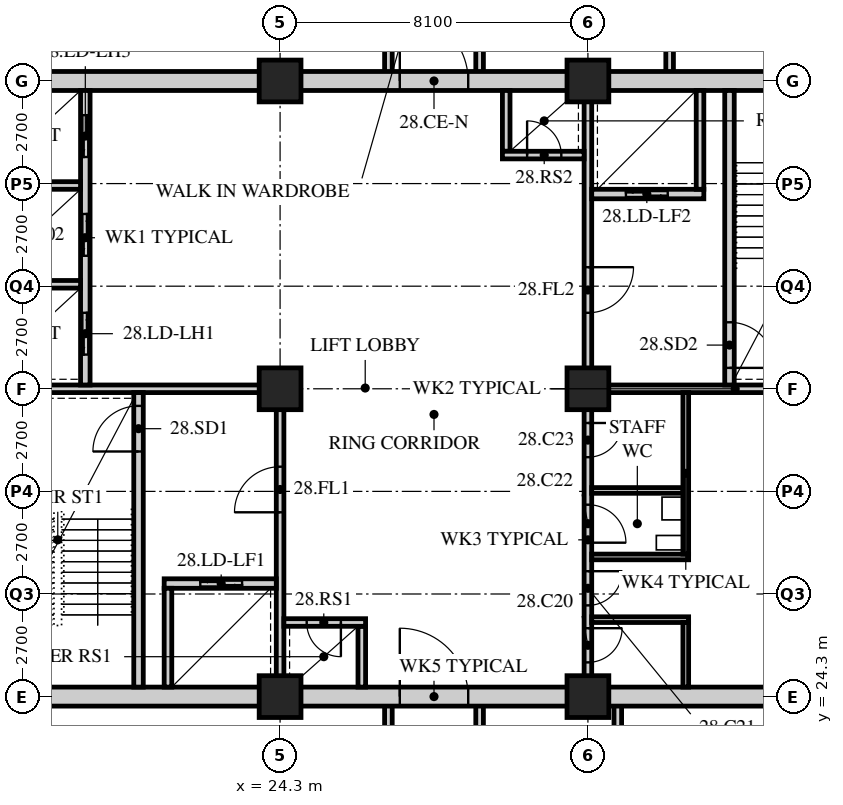
"""IFC4 building model, lengths in metres.
Left out: names, types, materials, properties, quantities, classifications, styles, units other than length and angle.
Written with IfcOpenShell. Run it as: python <this file> out.ifc"""

import sys

from ifc_helpers import new_model, si_unit, direction, frame, frame_2d, origin, origin_2d, place, context, subcontext, project, spatial, rectangle, hollow_rectangle, extrude, element, fill, save


model = new_model("IFC4")
c1 = context("Model", 3, precision=1e-05, world=origin(), true_north=direction((0.0, 1.0)))
c2 = subcontext(c1, "Body", "Model", "MODEL_VIEW")
j1 = project(units=[si_unit("LENGTHUNIT", "METRE"), si_unit("PLANEANGLEUNIT", "RADIAN")], contexts=[c1])
p1 = place(None, origin())
s1 = spatial("IfcSite", under=j1, at=p1, CompositionType="ELEMENT")
p2 = place(p1, origin())
s2 = spatial("IfcBuilding", under=s1, at=p2, CompositionType="ELEMENT")
p3 = place(p2, frame((0.0, 0.0, 113.6)))
s3 = spatial("IfcBuildingStorey", under=s2, at=p3, CompositionType="ELEMENT", Elevation=113.6)
for number, where, z_axis, x_axis in (
    (1, (24.3, 24.3, 0.0), (0.0, 0.0, 1.0), (1.0, 0.0, 0.0)),
    (2, (24.3, 32.4, 0.0), (0.0, 0.0, 1.0), (1.0, 0.0, 0.0)),
    (3, (24.3, 40.5, 0.0), (0.0, 0.0, 1.0), (1.0, 0.0, 0.0)),
    (4, (32.4, 24.3, 0.0), (0.0, 0.0, 1.0), (1.0, 0.0, 0.0)),
    (5, (32.4, 32.4, 0.0), (0.0, 0.0, 1.0), (1.0, 0.0, 0.0)),
    (6, (32.4, 40.5, 0.0), (0.0, 0.0, 1.0), (1.0, 0.0, 0.0)),
):
    element("IfcColumn", number, at=place(p3, frame(where, z_axis=z_axis, x_axis=x_axis)), inside=s3, PredefinedType="COLUMN", context=c2, shape_type="SweptSolid", body=[
        extrude(hollow_rectangle(XDim=1.1, YDim=1.1, WallThickness=0.1, at=origin_2d()), origin(), (0.0, 0.0, 1.0), 3.4),
    ])
for number, where, z_axis, x_axis in (
    (7, (33.186, 19.35, 0.0), (0.0, 0.0, 1.0), (0.0, 1.0, 0.0)),
    (8, (27.15, 19.35, 0.0), (0.0, 0.0, 1.0), (0.0, 1.0, 0.0)),
    (9, (29.55, 19.35, 0.0), (0.0, 0.0, 1.0), (0.0, 1.0, 0.0)),
):
    element("IfcWall", number, at=place(p3, frame(where, z_axis=z_axis, x_axis=x_axis)), inside=s3, PredefinedType="SOLIDWALL", context=c2, shape_type="SweptSolid", body=[
        extrude(rectangle(XDim=4.95, YDim=0.2, at=frame_2d((2.475, 0.0))), origin(), (0.0, 0.0, 1.0), 3.19),
    ])
for number, where, z_axis, x_axis in (
    (10, (34.55, 44.1, 0.0), (0.0, 0.0, 1.0), (0.0, -1.0, 0.0)),
    (11, (27.15, 40.5, 0.0), (0.0, 0.0, 1.0), (0.0, 1.0, 0.0)),
    (12, (29.55, 40.5, 0.0), (0.0, 0.0, 1.0), (0.0, 1.0, 0.0)),
):
    element("IfcWall", number, at=place(p3, frame(where, z_axis=z_axis, x_axis=x_axis)), inside=s3, PredefinedType="SOLIDWALL", context=c2, shape_type="SweptSolid", body=[
        extrude(rectangle(XDim=3.6, YDim=0.2, at=frame_2d((1.8, 0.0))), origin(), (0.0, 0.0, 1.0), 3.19),
    ])
p4 = place(p3, frame((15.95, 24.3, 0.0), z_axis=(0.0, 0.0, 1.0), x_axis=(1.0, 0.0, 0.0)))
e13 = element("IfcWall", 13, at=p4, inside=s3, PredefinedType="SOLIDWALL", context=c2, shape_type="SweptSolid", body=[
    extrude(rectangle(XDim=24.8, YDim=0.5, at=frame_2d((12.4, 0.0))), origin(), (0.0, 0.0, 1.0), 2.54),
])
p5 = place(p4, frame((11.5, 0.0, 0.0)))
e14 = element("IfcOpeningElement", 14, at=p5, cuts=e13, PredefinedType="OPENING", context=c2, shape_type="SweptSolid", body=[
    extrude(rectangle(XDim=1.8, YDim=2.4, at=frame_2d((0.9, 1.2))), frame((0.0, 0.26, 0.0), z_axis=(0.0, -1.0, 0.0), x_axis=(1.0, 0.0, 0.0)), (0.0, 0.0, 1.0), 0.52),
])
p6 = place(p3, frame((15.95, 40.5, 0.0), z_axis=(0.0, 0.0, 1.0), x_axis=(1.0, 0.0, 0.0)))
e15 = element("IfcWall", 15, at=p6, inside=s3, PredefinedType="SOLIDWALL", context=c2, shape_type="SweptSolid", body=[
    extrude(rectangle(XDim=24.8, YDim=0.5, at=frame_2d((12.4, 0.0))), origin(), (0.0, 0.0, 1.0), 2.54),
])
p7 = place(p6, frame((11.5, 0.0, 0.0)))
e16 = element("IfcOpeningElement", 16, at=p7, cuts=e15, PredefinedType="OPENING", context=c2, shape_type="SweptSolid", body=[
    extrude(rectangle(XDim=1.8, YDim=2.4, at=frame_2d((0.9, 1.2))), frame((0.0, 0.26, 0.0), z_axis=(0.0, -1.0, 0.0), x_axis=(1.0, 0.0, 0.0)), (0.0, 0.0, 1.0), 0.52),
])
p8 = place(p3, frame((16.45, 32.4, 0.0), z_axis=(0.0, 0.0, 1.0), x_axis=(1.0, 0.0, 0.0)))
e17 = element("IfcWall", 17, at=p8, inside=s3, PredefinedType="SOLIDWALL", context=c2, shape_type="SweptSolid", body=[
    extrude(rectangle(XDim=7.95, YDim=0.2, at=frame_2d((3.975, 0.0))), origin(), (0.0, 0.0, 1.0), 2.578),
])
p9 = place(p3, frame((24.3, 24.55, 0.0), z_axis=(0.0, 0.0, 1.0), x_axis=(0.0, 1.0, 0.0)))
e18 = element("IfcWall", 18, at=p9, inside=s3, PredefinedType="SOLIDWALL", context=c2, shape_type="SweptSolid", body=[
    extrude(rectangle(XDim=7.75, YDim=0.2, at=frame_2d((3.875, 0.0))), origin(), (0.0, 0.0, 1.0), 2.578),
])
p10 = place(p9, frame((4.6, 0.0, 0.0)))
e19 = element("IfcOpeningElement", 19, at=p10, cuts=e18, PredefinedType="OPENING", context=c2, shape_type="SweptSolid", body=[
    extrude(rectangle(XDim=1.2, YDim=2.1, at=frame_2d((0.6, 1.05))), frame((0.0, 0.11, 0.0), z_axis=(0.0, -1.0, 0.0), x_axis=(1.0, 0.0, 0.0)), (0.0, 0.0, 1.0), 0.22),
])
p11 = place(p3, frame((20.575, 24.55, 0.0), z_axis=(0.0, 0.0, 1.0), x_axis=(0.0, 1.0, 0.0)))
e20 = element("IfcWall", 20, at=p11, inside=s3, PredefinedType="SOLIDWALL", context=c2, shape_type="SweptSolid", body=[
    extrude(rectangle(XDim=7.75, YDim=0.25, at=frame_2d((3.875, 0.0))), origin(), (0.0, 0.0, 1.0), 3.19),
])
p12 = place(p11, frame((6.2, 0.0, 0.0)))
e21 = element("IfcOpeningElement", 21, at=p12, cuts=e20, PredefinedType="OPENING", context=c2, shape_type="SweptSolid", body=[
    extrude(rectangle(XDim=1.2, YDim=2.1, at=frame_2d((0.6, 1.05))), frame((0.0, 0.135, 0.0), z_axis=(0.0, -1.0, 0.0), x_axis=(1.0, 0.0, 0.0)), (0.0, 0.0, 1.0), 0.27),
])
p13 = place(p3, frame((21.25, 27.275, 0.0), z_axis=(0.0, 0.0, 1.0), x_axis=(1.0, 0.0, 0.0)))
e22 = element("IfcWall", 22, at=p13, inside=s3, PredefinedType="SOLIDWALL", context=c2, shape_type="SweptSolid", body=[
    extrude(rectangle(XDim=2.95, YDim=0.25, at=frame_2d((1.475, 0.0))), origin(), (0.0, 0.0, 1.0), 3.19),
])
p14 = place(p13, frame((0.95, 0.0, 0.0)))
e23 = element("IfcOpeningElement", 23, at=p14, cuts=e22, PredefinedType="OPENING", context=c2, shape_type="SweptSolid", body=[
    extrude(rectangle(XDim=1.1, YDim=2.4, at=frame_2d((0.55, 1.2))), frame((0.0, 0.135, 0.0), z_axis=(0.0, -1.0, 0.0), x_axis=(1.0, 0.0, 0.0)), (0.0, 0.0, 1.0), 0.27),
])
p15 = place(p3, frame((21.35, 24.55, 0.0), z_axis=(0.0, 0.0, 1.0), x_axis=(0.0, 1.0, 0.0)))
e24 = element("IfcWall", 24, at=p15, inside=s3, PredefinedType="SOLIDWALL", context=c2, shape_type="SweptSolid", body=[
    extrude(rectangle(XDim=2.6, YDim=0.2, at=frame_2d((1.3, 0.0))), origin(), (0.0, 0.0, 1.0), 3.19),
])
p16 = place(p3, frame((19.175, 32.5, 0.0), z_axis=(0.0, 0.0, 1.0), x_axis=(0.0, 1.0, 0.0)))
e25 = element("IfcWall", 25, at=p16, inside=s3, PredefinedType="SOLIDWALL", context=c2, shape_type="SweptSolid", body=[
    extrude(rectangle(XDim=7.75, YDim=0.25, at=frame_2d((3.875, 0.0))), origin(), (0.0, 0.0, 1.0), 3.19),
])
p17 = place(p16, frame((0.8, 0.0, 0.0)))
e26 = element("IfcOpeningElement", 26, at=p17, cuts=e25, PredefinedType="OPENING", context=c2, shape_type="SweptSolid", body=[
    extrude(rectangle(XDim=1.1, YDim=2.4, at=frame_2d((0.55, 1.2))), frame((0.0, 0.135, 0.0), z_axis=(0.0, -1.0, 0.0), x_axis=(1.0, 0.0, 0.0)), (0.0, 0.0, 1.0), 0.27),
])
p18 = place(p16, frame((3.4, 0.0, 0.0)))
e27 = element("IfcOpeningElement", 27, at=p18, cuts=e25, PredefinedType="OPENING", context=c2, shape_type="SweptSolid", body=[
    extrude(rectangle(XDim=1.1, YDim=2.4, at=frame_2d((0.55, 1.2))), frame((0.0, 0.135, 0.0), z_axis=(0.0, -1.0, 0.0), x_axis=(1.0, 0.0, 0.0)), (0.0, 0.0, 1.0), 0.27),
])
p19 = place(p16, frame((6.0, 0.0, 0.0)))
e28 = element("IfcOpeningElement", 28, at=p19, cuts=e25, PredefinedType="OPENING", context=c2, shape_type="SweptSolid", body=[
    extrude(rectangle(XDim=1.1, YDim=2.4, at=frame_2d((0.55, 1.2))), frame((0.0, 0.135, 0.0), z_axis=(0.0, -1.0, 0.0), x_axis=(1.0, 0.0, 0.0)), (0.0, 0.0, 1.0), 0.27),
])
for number, where, z_axis, x_axis in (
    (29, (16.45, 35.15, 0.0), (0.0, 0.0, 1.0), (1.0, 0.0, 0.0)),
    (30, (16.45, 37.75, 0.0), (0.0, 0.0, 1.0), (1.0, 0.0, 0.0)),
):
    element("IfcWall", number, at=place(p3, frame(where, z_axis=z_axis, x_axis=x_axis)), inside=s3, PredefinedType="SOLIDWALL", context=c2, shape_type="SweptSolid", body=[
        extrude(rectangle(XDim=2.6, YDim=0.2, at=frame_2d((1.3, 0.0))), origin(), (0.0, 0.0, 1.0), 3.19),
    ])
p20 = place(p3, frame((26.45, 24.55, 0.0), z_axis=(0.0, 0.0, 1.0), x_axis=(0.0, 1.0, 0.0)))
e31 = element("IfcWall", 31, at=p20, inside=s3, PredefinedType="SOLIDWALL", context=c2, shape_type="SweptSolid", body=[
    extrude(rectangle(XDim=1.6, YDim=0.2, at=frame_2d((0.8, 0.0))), origin(), (0.0, 0.0, 1.0), 3.19),
])
p21 = place(p3, frame((24.4, 26.25, 0.0), z_axis=(0.0, 0.0, 1.0), x_axis=(1.0, 0.0, 0.0)))
e32 = element("IfcWall", 32, at=p21, inside=s3, PredefinedType="SOLIDWALL", context=c2, shape_type="SweptSolid", body=[
    extrude(rectangle(XDim=2.15, YDim=0.2, at=frame_2d((1.075, 0.0))), origin(), (0.0, 0.0, 1.0), 3.19),
])
p22 = place(p21, frame((0.6, 0.0, 0.0)))
e33 = element("IfcOpeningElement", 33, at=p22, cuts=e32, PredefinedType="OPENING", context=c2, shape_type="SweptSolid", body=[
    extrude(rectangle(XDim=0.9, YDim=2.1, at=frame_2d((0.45, 1.05))), frame((0.0, 0.11, 0.0), z_axis=(0.0, -1.0, 0.0), x_axis=(1.0, 0.0, 0.0)), (0.0, 0.0, 1.0), 0.22),
])
p23 = place(p3, frame((32.3, 32.4, 0.0), z_axis=(0.0, 0.0, 1.0), x_axis=(1.0, 0.0, 0.0)))
e34 = element("IfcWall", 34, at=p23, inside=s3, PredefinedType="SOLIDWALL", context=c2, shape_type="SweptSolid", body=[
    extrude(rectangle(XDim=7.95, YDim=0.2, at=frame_2d((3.975, 0.0))), origin(), (0.0, 0.0, 1.0), 2.578),
])
p24 = place(p3, frame((32.4, 32.5, 0.0), z_axis=(0.0, 0.0, 1.0), x_axis=(0.0, 1.0, 0.0)))
e35 = element("IfcWall", 35, at=p24, inside=s3, PredefinedType="SOLIDWALL", context=c2, shape_type="SweptSolid", body=[
    extrude(rectangle(XDim=7.75, YDim=0.2, at=frame_2d((3.875, 0.0))), origin(), (0.0, 0.0, 1.0), 2.578),
])
p25 = place(p24, frame((1.9, 0.0, 0.0)))
e36 = element("IfcOpeningElement", 36, at=p25, cuts=e35, PredefinedType="OPENING", context=c2, shape_type="SweptSolid", body=[
    extrude(rectangle(XDim=1.2, YDim=2.1, at=frame_2d((0.6, 1.05))), frame((0.0, 0.11, 0.0), z_axis=(0.0, -1.0, 0.0), x_axis=(1.0, 0.0, 0.0)), (0.0, 0.0, 1.0), 0.22),
])
p26 = place(p3, frame((36.125, 32.5, 0.0), z_axis=(0.0, 0.0, 1.0), x_axis=(0.0, 1.0, 0.0)))
e37 = element("IfcWall", 37, at=p26, inside=s3, PredefinedType="SOLIDWALL", context=c2, shape_type="SweptSolid", body=[
    extrude(rectangle(XDim=7.75, YDim=0.25, at=frame_2d((3.875, 0.0))), origin(), (0.0, 0.0, 1.0), 3.19),
])
p27 = place(p26, frame((0.45, 0.0, 0.0)))
e38 = element("IfcOpeningElement", 38, at=p27, cuts=e37, PredefinedType="OPENING", context=c2, shape_type="SweptSolid", body=[
    extrude(rectangle(XDim=1.2, YDim=2.1, at=frame_2d((0.6, 1.05))), frame((0.0, 0.135, 0.0), z_axis=(0.0, -1.0, 0.0), x_axis=(1.0, 0.0, 0.0)), (0.0, 0.0, 1.0), 0.27),
])
p28 = place(p3, frame((32.5, 37.525, 0.0), z_axis=(0.0, 0.0, 1.0), x_axis=(1.0, 0.0, 0.0)))
e39 = element("IfcWall", 39, at=p28, inside=s3, PredefinedType="SOLIDWALL", context=c2, shape_type="SweptSolid", body=[
    extrude(rectangle(XDim=2.95, YDim=0.25, at=frame_2d((1.475, 0.0))), origin(), (0.0, 0.0, 1.0), 3.19),
])
p29 = place(p28, frame((0.9, 0.0, 0.0)))
e40 = element("IfcOpeningElement", 40, at=p29, cuts=e39, PredefinedType="OPENING", context=c2, shape_type="SweptSolid", body=[
    extrude(rectangle(XDim=1.1, YDim=2.4, at=frame_2d((0.55, 1.2))), frame((0.0, 0.135, 0.0), z_axis=(0.0, -1.0, 0.0), x_axis=(1.0, 0.0, 0.0)), (0.0, 0.0, 1.0), 0.27),
])
p30 = place(p3, frame((35.35, 37.65, 0.0), z_axis=(0.0, 0.0, 1.0), x_axis=(0.0, 1.0, 0.0)))
e41 = element("IfcWall", 41, at=p30, inside=s3, PredefinedType="SOLIDWALL", context=c2, shape_type="SweptSolid", body=[
    extrude(rectangle(XDim=2.6, YDim=0.2, at=frame_2d((1.3, 0.0))), origin(), (0.0, 0.0, 1.0), 3.19),
])
p31 = place(p3, frame((30.25, 38.65, 0.0), z_axis=(0.0, 0.0, 1.0), x_axis=(0.0, 1.0, 0.0)))
e42 = element("IfcWall", 42, at=p31, inside=s3, PredefinedType="SOLIDWALL", context=c2, shape_type="SweptSolid", body=[
    extrude(rectangle(XDim=1.6, YDim=0.2, at=frame_2d((0.8, 0.0))), origin(), (0.0, 0.0, 1.0), 3.19),
])
p32 = place(p3, frame((30.15, 38.55, 0.0), z_axis=(0.0, 0.0, 1.0), x_axis=(1.0, 0.0, 0.0)))
e43 = element("IfcWall", 43, at=p32, inside=s3, PredefinedType="SOLIDWALL", context=c2, shape_type="SweptSolid", body=[
    extrude(rectangle(XDim=2.15, YDim=0.2, at=frame_2d((1.075, 0.0))), origin(), (0.0, 0.0, 1.0), 3.19),
])
p33 = place(p32, frame((0.65, 0.0, 0.0)))
e44 = element("IfcOpeningElement", 44, at=p33, cuts=e43, PredefinedType="OPENING", context=c2, shape_type="SweptSolid", body=[
    extrude(rectangle(XDim=0.9, YDim=2.1, at=frame_2d((0.45, 1.05))), frame((0.0, 0.11, 0.0), z_axis=(0.0, -1.0, 0.0), x_axis=(1.0, 0.0, 0.0)), (0.0, 0.0, 1.0), 0.22),
])
p34 = place(p3, frame((32.4, 24.55, 0.0), z_axis=(0.0, 0.0, 1.0), x_axis=(0.0, 1.0, 0.0)))
e45 = element("IfcWall", 45, at=p34, inside=s3, PredefinedType="PARTITIONING", context=c2, shape_type="SweptSolid", body=[
    extrude(rectangle(XDim=7.75, YDim=0.2, at=frame_2d((3.875, 0.0))), origin(), (0.0, 0.0, 1.0), 2.578),
])
p35 = place(p34, frame((0.65, 0.0, 0.0)))
e46 = element("IfcOpeningElement", 46, at=p35, cuts=e45, PredefinedType="OPENING", context=c2, shape_type="SweptSolid", body=[
    extrude(rectangle(XDim=0.9, YDim=2.1, at=frame_2d((0.45, 1.05))), frame((0.0, 0.11, 0.0), z_axis=(0.0, -1.0, 0.0), x_axis=(1.0, 0.0, 0.0)), (0.0, 0.0, 1.0), 0.22),
])
p36 = place(p34, frame((2.15, 0.0, 0.0)))
e47 = element("IfcOpeningElement", 47, at=p36, cuts=e45, PredefinedType="OPENING", context=c2, shape_type="SweptSolid", body=[
    extrude(rectangle(XDim=0.9, YDim=2.1, at=frame_2d((0.45, 1.05))), frame((0.0, 0.11, 0.0), z_axis=(0.0, -1.0, 0.0), x_axis=(1.0, 0.0, 0.0)), (0.0, 0.0, 1.0), 0.22),
])
p37 = place(p34, frame((3.8, 0.0, 0.0)))
e48 = element("IfcOpeningElement", 48, at=p37, cuts=e45, PredefinedType="OPENING", context=c2, shape_type="SweptSolid", body=[
    extrude(rectangle(XDim=1.0, YDim=2.1, at=frame_2d((0.5, 1.05))), frame((0.0, 0.11, 0.0), z_axis=(0.0, -1.0, 0.0), x_axis=(1.0, 0.0, 0.0)), (0.0, 0.0, 1.0), 0.22),
])
p38 = place(p34, frame((6.05, 0.0, 0.0)))
e49 = element("IfcOpeningElement", 49, at=p38, cuts=e45, PredefinedType="OPENING", context=c2, shape_type="SweptSolid", body=[
    extrude(rectangle(XDim=0.9, YDim=2.1, at=frame_2d((0.45, 1.05))), frame((0.0, 0.11, 0.0), z_axis=(0.0, -1.0, 0.0), x_axis=(1.0, 0.0, 0.0)), (0.0, 0.0, 1.0), 0.22),
])
for number, where, z_axis, x_axis in (
    (50, (32.5, 26.325, 0.0), (0.0, 0.0, 1.0), (1.0, 0.0, 0.0)),
    (51, (32.5, 27.975, 0.0), (0.0, 0.0, 1.0), (1.0, 0.0, 0.0)),
):
    element("IfcWall", number, at=place(p3, frame(where, z_axis=z_axis, x_axis=x_axis)), inside=s3, PredefinedType="PARTITIONING", context=c2, shape_type="SweptSolid", body=[
        extrude(rectangle(XDim=2.55, YDim=0.15, at=frame_2d((1.275, 0.0))), origin(), (0.0, 0.0, 1.0), 3.19),
    ])
p39 = place(p3, frame((32.5, 29.725, 0.0), z_axis=(0.0, 0.0, 1.0), x_axis=(1.0, 0.0, 0.0)))
e52 = element("IfcWall", 52, at=p39, inside=s3, PredefinedType="PARTITIONING", context=c2, shape_type="SweptSolid", body=[
    extrude(rectangle(XDim=2.4, YDim=0.15, at=frame_2d((1.2, 0.0))), origin(), (0.0, 0.0, 1.0), 3.19),
])
p40 = place(p3, frame((34.975, 24.55, 0.0), z_axis=(0.0, 0.0, 1.0), x_axis=(0.0, 1.0, 0.0)))
e53 = element("IfcWall", 53, at=p40, inside=s3, PredefinedType="PARTITIONING", context=c2, shape_type="SweptSolid", body=[
    extrude(rectangle(XDim=1.7, YDim=0.15, at=frame_2d((0.85, 0.0))), origin(), (0.0, 0.0, 1.0), 3.19),
])
p41 = place(p3, frame((34.975, 28.05, 0.0), z_axis=(0.0, 0.0, 1.0), x_axis=(0.0, 1.0, 0.0)))
e54 = element("IfcWall", 54, at=p41, inside=s3, PredefinedType="PARTITIONING", context=c2, shape_type="SweptSolid", body=[
    extrude(rectangle(XDim=4.25, YDim=0.15, at=frame_2d((2.125, 0.0))), origin(), (0.0, 0.0, 1.0), 3.19),
])
p42 = place(p35, origin())
e55 = element("IfcDoor", 55, at=p42, inside=s3, OperationType="SINGLE_SWING_LEFT", PredefinedType="DOOR", context=c2, shape_type="SweptSolid", body=[
    extrude(rectangle(XDim=0.9, YDim=2.1, at=frame_2d((0.45, 1.05))), frame((0.0, 0.025, 0.0), z_axis=(0.0, -1.0, 0.0), x_axis=(1.0, 0.0, 0.0)), (0.0, 0.0, 1.0), 0.05),
])
fill(e46, e55)
p43 = place(p36, origin())
e56 = element("IfcDoor", 56, at=p43, inside=s3, OperationType="SINGLE_SWING_LEFT", PredefinedType="DOOR", context=c2, shape_type="SweptSolid", body=[
    extrude(rectangle(XDim=0.9, YDim=2.1, at=frame_2d((0.45, 1.05))), frame((0.0, 0.025, 0.0), z_axis=(0.0, -1.0, 0.0), x_axis=(1.0, 0.0, 0.0)), (0.0, 0.0, 1.0), 0.05),
])
fill(e47, e56)
p44 = place(p37, origin())
e57 = element("IfcDoor", 57, at=p44, inside=s3, OperationType="SINGLE_SWING_RIGHT", PredefinedType="DOOR", context=c2, shape_type="SweptSolid", body=[
    extrude(rectangle(XDim=1.0, YDim=2.1, at=frame_2d((0.5, 1.05))), frame((0.0, 0.025, 0.0), z_axis=(0.0, -1.0, 0.0), x_axis=(1.0, 0.0, 0.0)), (0.0, 0.0, 1.0), 0.05),
])
fill(e48, e57)
p45 = place(p38, origin())
e58 = element("IfcDoor", 58, at=p45, inside=s3, OperationType="SINGLE_SWING_LEFT", PredefinedType="DOOR", context=c2, shape_type="SweptSolid", body=[
    extrude(rectangle(XDim=0.9, YDim=2.1, at=frame_2d((0.45, 1.05))), frame((0.0, 0.025, 0.0), z_axis=(0.0, -1.0, 0.0), x_axis=(1.0, 0.0, 0.0)), (0.0, 0.0, 1.0), 0.05),
])
fill(e49, e58)
p46 = place(p12, origin())
e59 = element("IfcDoor", 59, at=p46, inside=s3, OperationType="SINGLE_SWING_LEFT", PredefinedType="DOOR", context=c2, shape_type="SweptSolid", body=[
    extrude(rectangle(XDim=1.2, YDim=2.1, at=frame_2d((0.6, 1.05))), frame((0.0, 0.025, 0.0), z_axis=(0.0, -1.0, 0.0), x_axis=(1.0, 0.0, 0.0)), (0.0, 0.0, 1.0), 0.05),
])
fill(e21, e59)
p47 = place(p10, origin())
e60 = element("IfcDoor", 60, at=p47, inside=s3, OperationType="SINGLE_SWING_LEFT", PredefinedType="DOOR", context=c2, shape_type="SweptSolid", body=[
    extrude(rectangle(XDim=1.2, YDim=2.1, at=frame_2d((0.6, 1.05))), frame((0.0, 0.025, 0.0), z_axis=(0.0, -1.0, 0.0), x_axis=(1.0, 0.0, 0.0)), (0.0, 0.0, 1.0), 0.05),
])
fill(e19, e60)
p48 = place(p22, origin())
e61 = element("IfcDoor", 61, at=p48, inside=s3, OperationType="SINGLE_SWING_LEFT", PredefinedType="DOOR", context=c2, shape_type="SweptSolid", body=[
    extrude(rectangle(XDim=0.9, YDim=2.1, at=frame_2d((0.45, 1.05))), frame((0.0, 0.025, 0.0), z_axis=(0.0, -1.0, 0.0), x_axis=(1.0, 0.0, 0.0)), (0.0, 0.0, 1.0), 0.05),
])
fill(e33, e61)
p49 = place(p27, origin())
e62 = element("IfcDoor", 62, at=p49, inside=s3, OperationType="SINGLE_SWING_RIGHT", PredefinedType="DOOR", context=c2, shape_type="SweptSolid", body=[
    extrude(rectangle(XDim=1.2, YDim=2.1, at=frame_2d((0.6, 1.05))), frame((0.0, 0.025, 0.0), z_axis=(0.0, -1.0, 0.0), x_axis=(1.0, 0.0, 0.0)), (0.0, 0.0, 1.0), 0.05),
])
fill(e38, e62)
p50 = place(p25, origin())
e63 = element("IfcDoor", 63, at=p50, inside=s3, OperationType="SINGLE_SWING_LEFT", PredefinedType="DOOR", context=c2, shape_type="SweptSolid", body=[
    extrude(rectangle(XDim=1.2, YDim=2.1, at=frame_2d((0.6, 1.05))), frame((0.0, 0.025, 0.0), z_axis=(0.0, -1.0, 0.0), x_axis=(1.0, 0.0, 0.0)), (0.0, 0.0, 1.0), 0.05),
])
fill(e36, e63)
p51 = place(p33, origin())
e64 = element("IfcDoor", 64, at=p51, inside=s3, OperationType="SINGLE_SWING_LEFT", PredefinedType="DOOR", context=c2, shape_type="SweptSolid", body=[
    extrude(rectangle(XDim=0.9, YDim=2.1, at=frame_2d((0.45, 1.05))), frame((0.0, 0.025, 0.0), z_axis=(0.0, -1.0, 0.0), x_axis=(1.0, 0.0, 0.0)), (0.0, 0.0, 1.0), 0.05),
])
fill(e44, e64)
p52 = place(p17, origin())
e65 = element("IfcDoor", 65, at=p52, inside=s3, OperationType="DOUBLE_DOOR_SLIDING", PredefinedType="DOOR", context=c2, shape_type="SweptSolid", body=[
    extrude(rectangle(XDim=1.1, YDim=2.4, at=frame_2d((0.55, 1.2))), frame((0.0, 0.025, 0.0), z_axis=(0.0, -1.0, 0.0), x_axis=(1.0, 0.0, 0.0)), (0.0, 0.0, 1.0), 0.05),
])
fill(e26, e65)
p53 = place(p18, origin())
e66 = element("IfcDoor", 66, at=p53, inside=s3, OperationType="DOUBLE_DOOR_SLIDING", PredefinedType="DOOR", context=c2, shape_type="SweptSolid", body=[
    extrude(rectangle(XDim=1.1, YDim=2.4, at=frame_2d((0.55, 1.2))), frame((0.0, 0.025, 0.0), z_axis=(0.0, -1.0, 0.0), x_axis=(1.0, 0.0, 0.0)), (0.0, 0.0, 1.0), 0.05),
])
fill(e27, e66)
p54 = place(p19, origin())
e67 = element("IfcDoor", 67, at=p54, inside=s3, OperationType="DOUBLE_DOOR_SLIDING", PredefinedType="DOOR", context=c2, shape_type="SweptSolid", body=[
    extrude(rectangle(XDim=1.1, YDim=2.4, at=frame_2d((0.55, 1.2))), frame((0.0, 0.025, 0.0), z_axis=(0.0, -1.0, 0.0), x_axis=(1.0, 0.0, 0.0)), (0.0, 0.0, 1.0), 0.05),
])
fill(e28, e67)
p55 = place(p14, origin())
e68 = element("IfcDoor", 68, at=p55, inside=s3, OperationType="DOUBLE_DOOR_SLIDING", PredefinedType="DOOR", context=c2, shape_type="SweptSolid", body=[
    extrude(rectangle(XDim=1.1, YDim=2.4, at=frame_2d((0.55, 1.2))), frame((0.0, 0.025, 0.0), z_axis=(0.0, -1.0, 0.0), x_axis=(1.0, 0.0, 0.0)), (0.0, 0.0, 1.0), 0.05),
])
fill(e23, e68)
p56 = place(p29, origin())
e69 = element("IfcDoor", 69, at=p56, inside=s3, OperationType="DOUBLE_DOOR_SLIDING", PredefinedType="DOOR", context=c2, shape_type="SweptSolid", body=[
    extrude(rectangle(XDim=1.1, YDim=2.4, at=frame_2d((0.55, 1.2))), frame((0.0, 0.025, 0.0), z_axis=(0.0, -1.0, 0.0), x_axis=(1.0, 0.0, 0.0)), (0.0, 0.0, 1.0), 0.05),
])
fill(e40, e69)
p57 = place(p5, origin())
e70 = element("IfcDoor", 70, at=p57, inside=s3, OperationType="DOUBLE_DOOR_SINGLE_SWING", PredefinedType="DOOR", context=c2, shape_type="SweptSolid", body=[
    extrude(rectangle(XDim=1.8, YDim=2.4, at=frame_2d((0.9, 1.2))), frame((0.0, 0.025, 0.0), z_axis=(0.0, -1.0, 0.0), x_axis=(1.0, 0.0, 0.0)), (0.0, 0.0, 1.0), 0.05),
])
fill(e14, e70)
p58 = place(p7, origin())
e71 = element("IfcDoor", 71, at=p58, inside=s3, OperationType="DOUBLE_DOOR_SINGLE_SWING", PredefinedType="DOOR", context=c2, shape_type="SweptSolid", body=[
    extrude(rectangle(XDim=1.8, YDim=2.4, at=frame_2d((0.9, 1.2))), frame((0.0, 0.025, 0.0), z_axis=(0.0, -1.0, 0.0), x_axis=(1.0, 0.0, 0.0)), (0.0, 0.0, 1.0), 0.05),
])
fill(e16, e71)
save(model, sys.argv[1])
